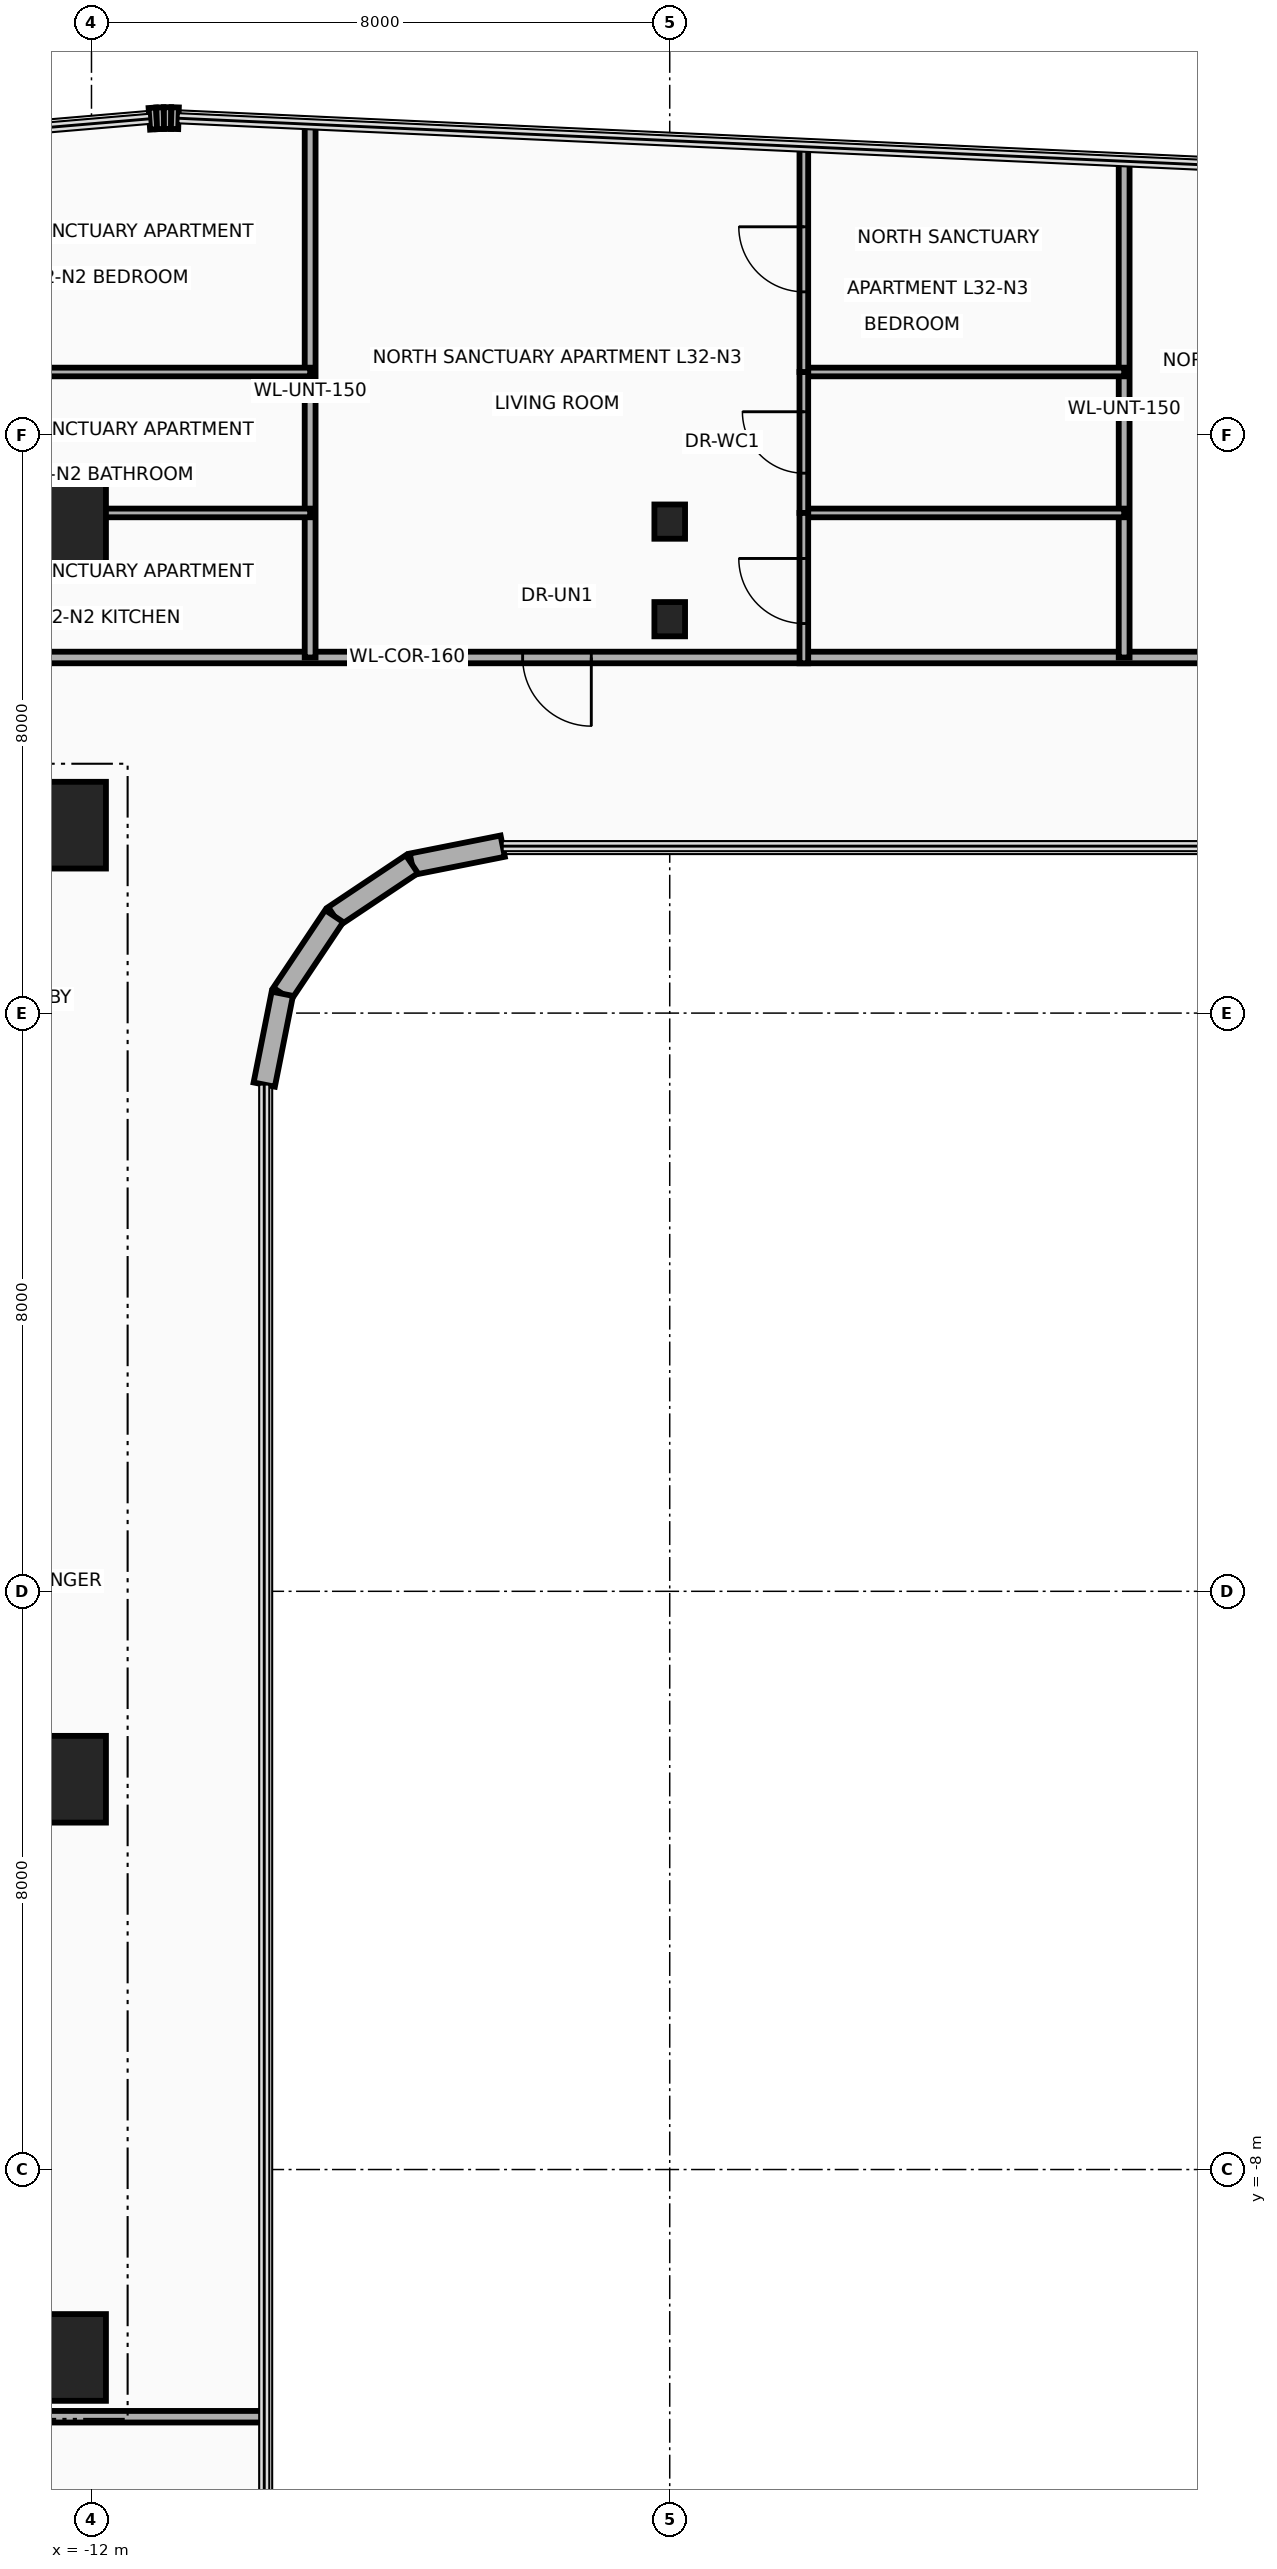
"""IFC4 building model, lengths in metres.
Left out: names, types, materials, properties, quantities, classifications, styles, units other than length and angle.
Written with IfcOpenShell. Run it as: python <this file> out.ifc"""

import sys

from ifc_helpers import new_model, si_unit, direction, frame, frame_2d, origin, origin_2d, place, context, subcontext, project, spatial, rectangle, i_section, extrude, source, transform, mapped, element, fill, save


model = new_model("IFC4")
c1 = context("Model", 3, precision=1e-05, world=origin(), true_north=direction((0.0, 1.0)))
c2 = subcontext(c1, "Body", "Model", "MODEL_VIEW")
j1 = project(units=[si_unit("LENGTHUNIT", "METRE"), si_unit("PLANEANGLEUNIT", "RADIAN")], contexts=[c1])
p1 = place(None, origin())
s1 = spatial("IfcSite", under=j1, at=p1, CompositionType="ELEMENT")
p2 = place(p1, origin())
s2 = spatial("IfcBuilding", under=s1, at=p2, CompositionType="ELEMENT")
p3 = place(p2, frame((0.0, 0.0, 127.9)))
s3 = spatial("IfcBuildingStorey", under=s2, at=p3, CompositionType="ELEMENT", Elevation=127.9)
for number, where, z_axis, x_axis in (
    (1, (-22.65, 10.8, 0.0), (0.0, 0.0, 1.0), (1.0, 0.0, 0.0)),
    (2, (-22.65, -10.8, 0.0), (0.0, 0.0, 1.0), (1.0, 0.0, 0.0)),
):
    element("IfcWall", number, at=place(p3, frame(where, z_axis=z_axis, x_axis=x_axis)), inside=s3, PredefinedType="SHEAR", context=c2, shape_type="SweptSolid", body=[
        extrude(rectangle(XDim=10.25, YDim=0.7, at=frame_2d((5.125, 0.0))), origin(), (0.0, 0.0, 1.0), 3.46),
    ])
m1 = source(origin(), c2, "Body", "SweptSolid", [
    extrude(rectangle(XDim=1.2, YDim=1.2, at=origin_2d()), origin(), (0.0, 0.0, 1.0), 3.7),
])
for number, where, z_axis, x_axis in (
    (3, (-12.4, -10.6, 0.0), (0.0, 0.0, 1.0), (1.0, 0.0, 0.0)),
    (4, (-12.4, -2.6, 0.0), (0.0, 0.0, 1.0), (1.0, 0.0, 0.0)),
    (5, (-12.4, 10.6, 0.0), (0.0, 0.0, 1.0), (1.0, 0.0, 0.0)),
    (6, (-12.4, 14.8, 0.0), (0.0, 0.0, 1.0), (1.0, 0.0, 0.0)),
):
    element("IfcColumn", number, at=place(p3, frame(where, z_axis=z_axis, x_axis=x_axis)), inside=s3, PredefinedType="COLUMN", context=c2, shape_type="MappedRepresentation", body=[
        mapped(m1, transform((0.0, 0.0, 0.0), x_axis=(1.0, 0.0, 0.0), y_axis=(0.0, 1.0, 0.0), z_axis=(0.0, 0.0, 1.0), scale=1.0)),
    ])
m2 = source(origin(), c2, "Body", "SweptSolid", [
    extrude(i_section(OverallWidth=0.424, OverallDepth=0.474, WebThickness=0.048, FlangeThickness=0.077, at=origin_2d()), origin(), (0.0, 0.0, 1.0), 3.7),
])
for number, where, z_axis, x_axis in (
    (7, (-4.0, 13.45, 0.0), (0.0, 0.0, 1.0), (1.0, 0.0, 0.0)),
    (8, (-4.0, 14.8, 0.0), (0.0, 0.0, 1.0), (1.0, 0.0, 0.0)),
):
    element("IfcColumn", number, at=place(p3, frame(where, z_axis=z_axis, x_axis=x_axis)), inside=s3, PredefinedType="COLUMN", context=c2, shape_type="MappedRepresentation", body=[
        mapped(m2, transform((0.0, 0.0, 0.0), x_axis=(1.0, 0.0, 0.0), y_axis=(0.0, 1.0, 0.0), z_axis=(0.0, 0.0, 1.0), scale=1.0)),
    ])
p4 = place(p3, frame((-11.199, 20.373, 0.0), z_axis=(0.0, 0.0, 1.0), x_axis=(0.997567332166, 0.069709524416, 0.0)))
e9 = element("IfcWall", 9, at=p4, inside=s3, PredefinedType="SOLIDWALL", context=c2, shape_type="SweptSolid", body=[
    extrude(rectangle(XDim=0.102, YDim=0.3, at=frame_2d((0.051, 0.0))), origin(), (0.0, 0.0, 1.0), 3.46),
])
p5 = place(p3, frame((-11.098, 20.38, 0.0), z_axis=(0.0, 0.0, 1.0), x_axis=(0.999334672785, 0.03647206835, 0.0)))
e10 = element("IfcWall", 10, at=p5, inside=s3, PredefinedType="SOLIDWALL", context=c2, shape_type="SweptSolid", body=[
    extrude(rectangle(XDim=0.1, YDim=0.3, at=frame_2d((0.05, 0.0))), origin(), (0.0, 0.0, 1.0), 3.46),
])
p6 = place(p3, frame((-10.998, 20.383, 0.0), z_axis=(0.0, 0.0, 1.0), x_axis=(0.999997054401, 0.002427177317, 0.0)))
e11 = element("IfcWall", 11, at=p6, inside=s3, PredefinedType="SOLIDWALL", context=c2, shape_type="SweptSolid", body=[
    extrude(rectangle(XDim=0.101, YDim=0.3, at=frame_2d((0.05, 0.0))), origin(), (0.0, 0.0, 1.0), 3.46),
])
p7 = place(p3, frame((-10.897, 20.384, 0.0), z_axis=(0.0, 0.0, 1.0), x_axis=(0.999584209171, -0.02883415988, 0.0)))
e12 = element("IfcWall", 12, at=p7, inside=s3, PredefinedType="SOLIDWALL", context=c2, shape_type="SweptSolid", body=[
    extrude(rectangle(XDim=0.102, YDim=0.3, at=frame_2d((0.051, 0.0))), origin(), (0.0, 0.0, 1.0), 3.46),
])
p8 = place(p3, frame((-6.311, 10.31, 0.0), z_axis=(0.0, 0.0, 1.0), x_axis=(-0.980778058848, -0.195126623715, 0.0)))
e13 = element("IfcWall", 13, at=p8, inside=s3, PredefinedType="SOLIDWALL", context=c2, shape_type="SweptSolid", body=[
    extrude(rectangle(XDim=1.281, YDim=0.3, at=frame_2d((0.641, 0.0))), origin(), (0.0, 0.0, 1.0), 3.46),
])
p9 = place(p3, frame((-7.567, 10.06, 0.0), z_axis=(0.0, 0.0, 1.0), x_axis=(-0.831497739511, -0.555528135371, 0.0)))
e14 = element("IfcWall", 14, at=p9, inside=s3, PredefinedType="SOLIDWALL", context=c2, shape_type="SweptSolid", body=[
    extrude(rectangle(XDim=1.292, YDim=0.3, at=frame_2d((0.646, 0.0))), origin(), (0.0, 0.0, 1.0), 3.46),
])
p10 = place(p3, frame((-8.642, 9.342, 0.0), z_axis=(0.0, 0.0, 1.0), x_axis=(-0.555615398575, -0.831439431869, 0.0)))
e15 = element("IfcWall", 15, at=p10, inside=s3, PredefinedType="SOLIDWALL", context=c2, shape_type="SweptSolid", body=[
    extrude(rectangle(XDim=1.292, YDim=0.3, at=frame_2d((0.646, 0.0))), origin(), (0.0, 0.0, 1.0), 3.46),
])
p11 = place(p3, frame((-9.36, 8.268, 0.0), z_axis=(0.0, 0.0, 1.0), x_axis=(-0.195090163074, -0.980785312019, 0.0)))
e16 = element("IfcWall", 16, at=p11, inside=s3, PredefinedType="SOLIDWALL", context=c2, shape_type="SweptSolid", body=[
    extrude(rectangle(XDim=1.281, YDim=0.3, at=frame_2d((0.641, 0.0))), origin(), (0.0, 0.0, 1.0), 3.46),
])
p12 = place(p3, frame((-23.45, -11.42, 0.0), z_axis=(0.0, 0.0, 1.0), x_axis=(1.0, 0.0, 0.0)))
e17 = element("IfcWall", 17, at=p12, inside=s3, PredefinedType="PARTITIONING", context=c2, shape_type="SweptSolid", body=[
    extrude(rectangle(XDim=13.84, YDim=0.16, at=frame_2d((6.92, 0.0))), origin(), (0.0, 0.0, 1.0), 2.834),
])
p13 = place(p3, frame((-28.25, 12.92, 0.0), z_axis=(0.0, 0.0, 1.0), x_axis=(1.0, 0.0, 0.0)))
e18 = element("IfcWall", 18, at=p13, inside=s3, PredefinedType="PARTITIONING", context=c2, shape_type="SweptSolid", body=[
    extrude(rectangle(XDim=41.8, YDim=0.16, at=frame_2d((20.9, 0.0))), origin(), (0.0, 0.0, 1.0), 2.666),
])
p14 = place(p13, frame((0.763, 0.0, 0.0)))
e19 = element("IfcOpeningElement", 19, at=p14, cuts=e18, PredefinedType="OPENING", context=c2, shape_type="SweptSolid", body=[
    extrude(rectangle(XDim=0.95, YDim=2.15, at=frame_2d((0.475, 1.075))), frame((0.0, 0.095, 0.0), z_axis=(0.0, -1.0, 0.0), x_axis=(1.0, 0.0, 0.0)), (0.0, 0.0, 1.0), 0.19),
])
p15 = place(p13, frame((10.696, 0.0, 0.0)))
e20 = element("IfcOpeningElement", 20, at=p15, cuts=e18, PredefinedType="OPENING", context=c2, shape_type="SweptSolid", body=[
    extrude(rectangle(XDim=0.95, YDim=2.15, at=frame_2d((0.475, 1.075))), frame((0.0, 0.095, 0.0), z_axis=(0.0, -1.0, 0.0), x_axis=(1.0, 0.0, 0.0)), (0.0, 0.0, 1.0), 0.19),
])
p16 = place(p13, frame((22.215, 0.0, 0.0)))
e21 = element("IfcOpeningElement", 21, at=p16, cuts=e18, PredefinedType="OPENING", context=c2, shape_type="SweptSolid", body=[
    extrude(rectangle(XDim=0.95, YDim=2.15, at=frame_2d((0.475, 1.075))), frame((0.0, 0.095, 0.0), z_axis=(0.0, -1.0, 0.0), x_axis=(1.0, 0.0, 0.0)), (0.0, 0.0, 1.0), 0.19),
])
p17 = place(p13, frame((32.652, 0.0, 0.0)))
e22 = element("IfcOpeningElement", 22, at=p17, cuts=e18, PredefinedType="OPENING", context=c2, shape_type="SweptSolid", body=[
    extrude(rectangle(XDim=0.95, YDim=2.15, at=frame_2d((0.475, 1.075))), frame((0.0, 0.095, 0.0), z_axis=(0.0, -1.0, 0.0), x_axis=(1.0, 0.0, 0.0)), (0.0, 0.0, 1.0), 0.19),
])
p18 = place(p3, frame((-8.975, 12.92, 0.0), z_axis=(0.0, 0.0, 1.0), x_axis=(0.0, 1.0, 0.0)))
e23 = element("IfcWall", 23, at=p18, inside=s3, PredefinedType="PARTITIONING", context=c2, shape_type="SweptSolid", body=[
    extrude(rectangle(XDim=7.378, YDim=0.15, at=frame_2d((3.689, 0.0))), origin(), (0.0, 0.0, 1.0), 2.666),
])
p19 = place(p3, frame((2.287, 12.92, 0.0), z_axis=(0.0, 0.0, 1.0), x_axis=(0.0, 1.0, 0.0)))
e24 = element("IfcWall", 24, at=p19, inside=s3, PredefinedType="PARTITIONING", context=c2, shape_type="SweptSolid", body=[
    extrude(rectangle(XDim=6.866, YDim=0.15, at=frame_2d((3.433, 0.0))), origin(), (0.0, 0.0, 1.0), 2.666),
])
p20 = place(p3, frame((-14.658, 14.92, 0.0), z_axis=(0.0, 0.0, 1.0), x_axis=(1.0, 0.0, 0.0)))
e25 = element("IfcWall", 25, at=p20, inside=s3, PredefinedType="PARTITIONING", context=c2, shape_type="SweptSolid", body=[
    extrude(rectangle(XDim=5.683, YDim=0.12, at=frame_2d((2.842, 0.0))), origin(), (0.0, 0.0, 1.0), 2.666),
])
p21 = place(p3, frame((-14.658, 16.87, 0.0), z_axis=(0.0, 0.0, 1.0), x_axis=(1.0, 0.0, 0.0)))
e26 = element("IfcWall", 26, at=p21, inside=s3, PredefinedType="PARTITIONING", context=c2, shape_type="SweptSolid", body=[
    extrude(rectangle(XDim=5.683, YDim=0.12, at=frame_2d((2.842, 0.0))), origin(), (0.0, 0.0, 1.0), 3.46),
])
p22 = place(p3, frame((-2.145, 14.92, 0.0), z_axis=(0.0, 0.0, 1.0), x_axis=(1.0, 0.0, 0.0)))
e27 = element("IfcWall", 27, at=p22, inside=s3, PredefinedType="PARTITIONING", context=c2, shape_type="SweptSolid", body=[
    extrude(rectangle(XDim=4.432, YDim=0.12, at=frame_2d((2.216, 0.0))), origin(), (0.0, 0.0, 1.0), 2.666),
])
p23 = place(p3, frame((-2.145, 16.87, 0.0), z_axis=(0.0, 0.0, 1.0), x_axis=(1.0, 0.0, 0.0)))
e28 = element("IfcWall", 28, at=p23, inside=s3, PredefinedType="PARTITIONING", context=c2, shape_type="SweptSolid", body=[
    extrude(rectangle(XDim=4.432, YDim=0.12, at=frame_2d((2.216, 0.0))), origin(), (0.0, 0.0, 1.0), 3.46),
])
p24 = place(p3, frame((-2.145, 14.92, 0.0), z_axis=(0.0, 0.0, 1.0), x_axis=(0.0, 1.0, 0.0)))
e29 = element("IfcWall", 29, at=p24, inside=s3, PredefinedType="PARTITIONING", context=c2, shape_type="SweptSolid", body=[
    extrude(rectangle(XDim=1.95, YDim=0.12, at=frame_2d((0.975, 0.0))), origin(), (0.0, 0.0, 1.0), 2.666),
])
p25 = place(p24, frame((0.55, 0.0, 0.0)))
e30 = element("IfcOpeningElement", 30, at=p25, cuts=e29, PredefinedType="OPENING", context=c2, shape_type="SweptSolid", body=[
    extrude(rectangle(XDim=0.85, YDim=2.1, at=frame_2d((0.425, 1.05))), frame((0.0, 0.075, 0.0), z_axis=(0.0, -1.0, 0.0), x_axis=(1.0, 0.0, 0.0)), (0.0, 0.0, 1.0), 0.15),
])
p26 = place(p3, frame((-2.145, 12.84, 0.0), z_axis=(0.0, 0.0, 1.0), x_axis=(0.0, 1.0, 0.0)))
e31 = element("IfcWall", 31, at=p26, inside=s3, PredefinedType="PARTITIONING", context=c2, shape_type="SweptSolid", body=[
    extrude(rectangle(XDim=2.08, YDim=0.12, at=frame_2d((1.04, 0.0))), origin(), (0.0, 0.0, 1.0), 2.666),
])
p27 = place(p26, frame((0.55, 0.0, 0.0)))
e32 = element("IfcOpeningElement", 32, at=p27, cuts=e31, PredefinedType="OPENING", context=c2, shape_type="SweptSolid", body=[
    extrude(rectangle(XDim=0.9, YDim=2.1, at=frame_2d((0.45, 1.05))), frame((0.0, 0.075, 0.0), z_axis=(0.0, -1.0, 0.0), x_axis=(1.0, 0.0, 0.0)), (0.0, 0.0, 1.0), 0.15),
])
p28 = place(p3, frame((-2.145, 16.87, 0.0), z_axis=(0.0, 0.0, 1.0), x_axis=(0.0, 1.0, 0.0)))
e33 = element("IfcWall", 33, at=p28, inside=s3, PredefinedType="PARTITIONING", context=c2, shape_type="SweptSolid", body=[
    extrude(rectangle(XDim=3.117, YDim=0.12, at=frame_2d((1.559, 0.0))), origin(), (0.0, 0.0, 1.0), 3.46),
])
p29 = place(p28, frame((1.109, 0.0, 0.0)))
e34 = element("IfcOpeningElement", 34, at=p29, cuts=e33, PredefinedType="OPENING", context=c2, shape_type="SweptSolid", body=[
    extrude(rectangle(XDim=0.9, YDim=2.1, at=frame_2d((0.45, 1.05))), frame((0.0, 0.075, 0.0), z_axis=(0.0, -1.0, 0.0), x_axis=(1.0, 0.0, 0.0)), (0.0, 0.0, 1.0), 0.15),
])
p30 = place(p16, frame((0.95, 0.0, 0.0), z_axis=(0.0, 0.0, 1.0), x_axis=(-1.0, 0.0, 0.0)))
e35 = element("IfcDoor", 35, at=p30, inside=s3, OperationType="SINGLE_SWING_LEFT", PredefinedType="DOOR", context=c2, shape_type="SweptSolid", body=[
    extrude(rectangle(XDim=0.95, YDim=2.15, at=frame_2d((0.475, 1.075))), frame((0.0, 0.025, 0.0), z_axis=(0.0, -1.0, 0.0), x_axis=(1.0, 0.0, 0.0)), (0.0, 0.0, 1.0), 0.05),
])
fill(e21, e35)
p31 = place(p25, origin())
e36 = element("IfcDoor", 36, at=p31, inside=s3, OperationType="SINGLE_SWING_RIGHT", PredefinedType="DOOR", context=c2, shape_type="SweptSolid", body=[
    extrude(rectangle(XDim=0.85, YDim=2.1, at=frame_2d((0.425, 1.05))), frame((0.0, 0.025, 0.0), z_axis=(0.0, -1.0, 0.0), x_axis=(1.0, 0.0, 0.0)), (0.0, 0.0, 1.0), 0.05),
])
fill(e30, e36)
p32 = place(p27, origin())
e37 = element("IfcDoor", 37, at=p32, inside=s3, OperationType="SINGLE_SWING_LEFT", PredefinedType="DOOR", context=c2, shape_type="SweptSolid", body=[
    extrude(rectangle(XDim=0.9, YDim=2.1, at=frame_2d((0.45, 1.05))), frame((0.0, 0.025, 0.0), z_axis=(0.0, -1.0, 0.0), x_axis=(1.0, 0.0, 0.0)), (0.0, 0.0, 1.0), 0.05),
])
fill(e32, e37)
p33 = place(p29, origin())
e38 = element("IfcDoor", 38, at=p33, inside=s3, OperationType="SINGLE_SWING_RIGHT", PredefinedType="DOOR", context=c2, shape_type="SweptSolid", body=[
    extrude(rectangle(XDim=0.9, YDim=2.1, at=frame_2d((0.45, 1.05))), frame((0.0, 0.025, 0.0), z_axis=(0.0, -1.0, 0.0), x_axis=(1.0, 0.0, 0.0)), (0.0, 0.0, 1.0), 0.05),
])
fill(e34, e38)
save(model, sys.argv[1])
